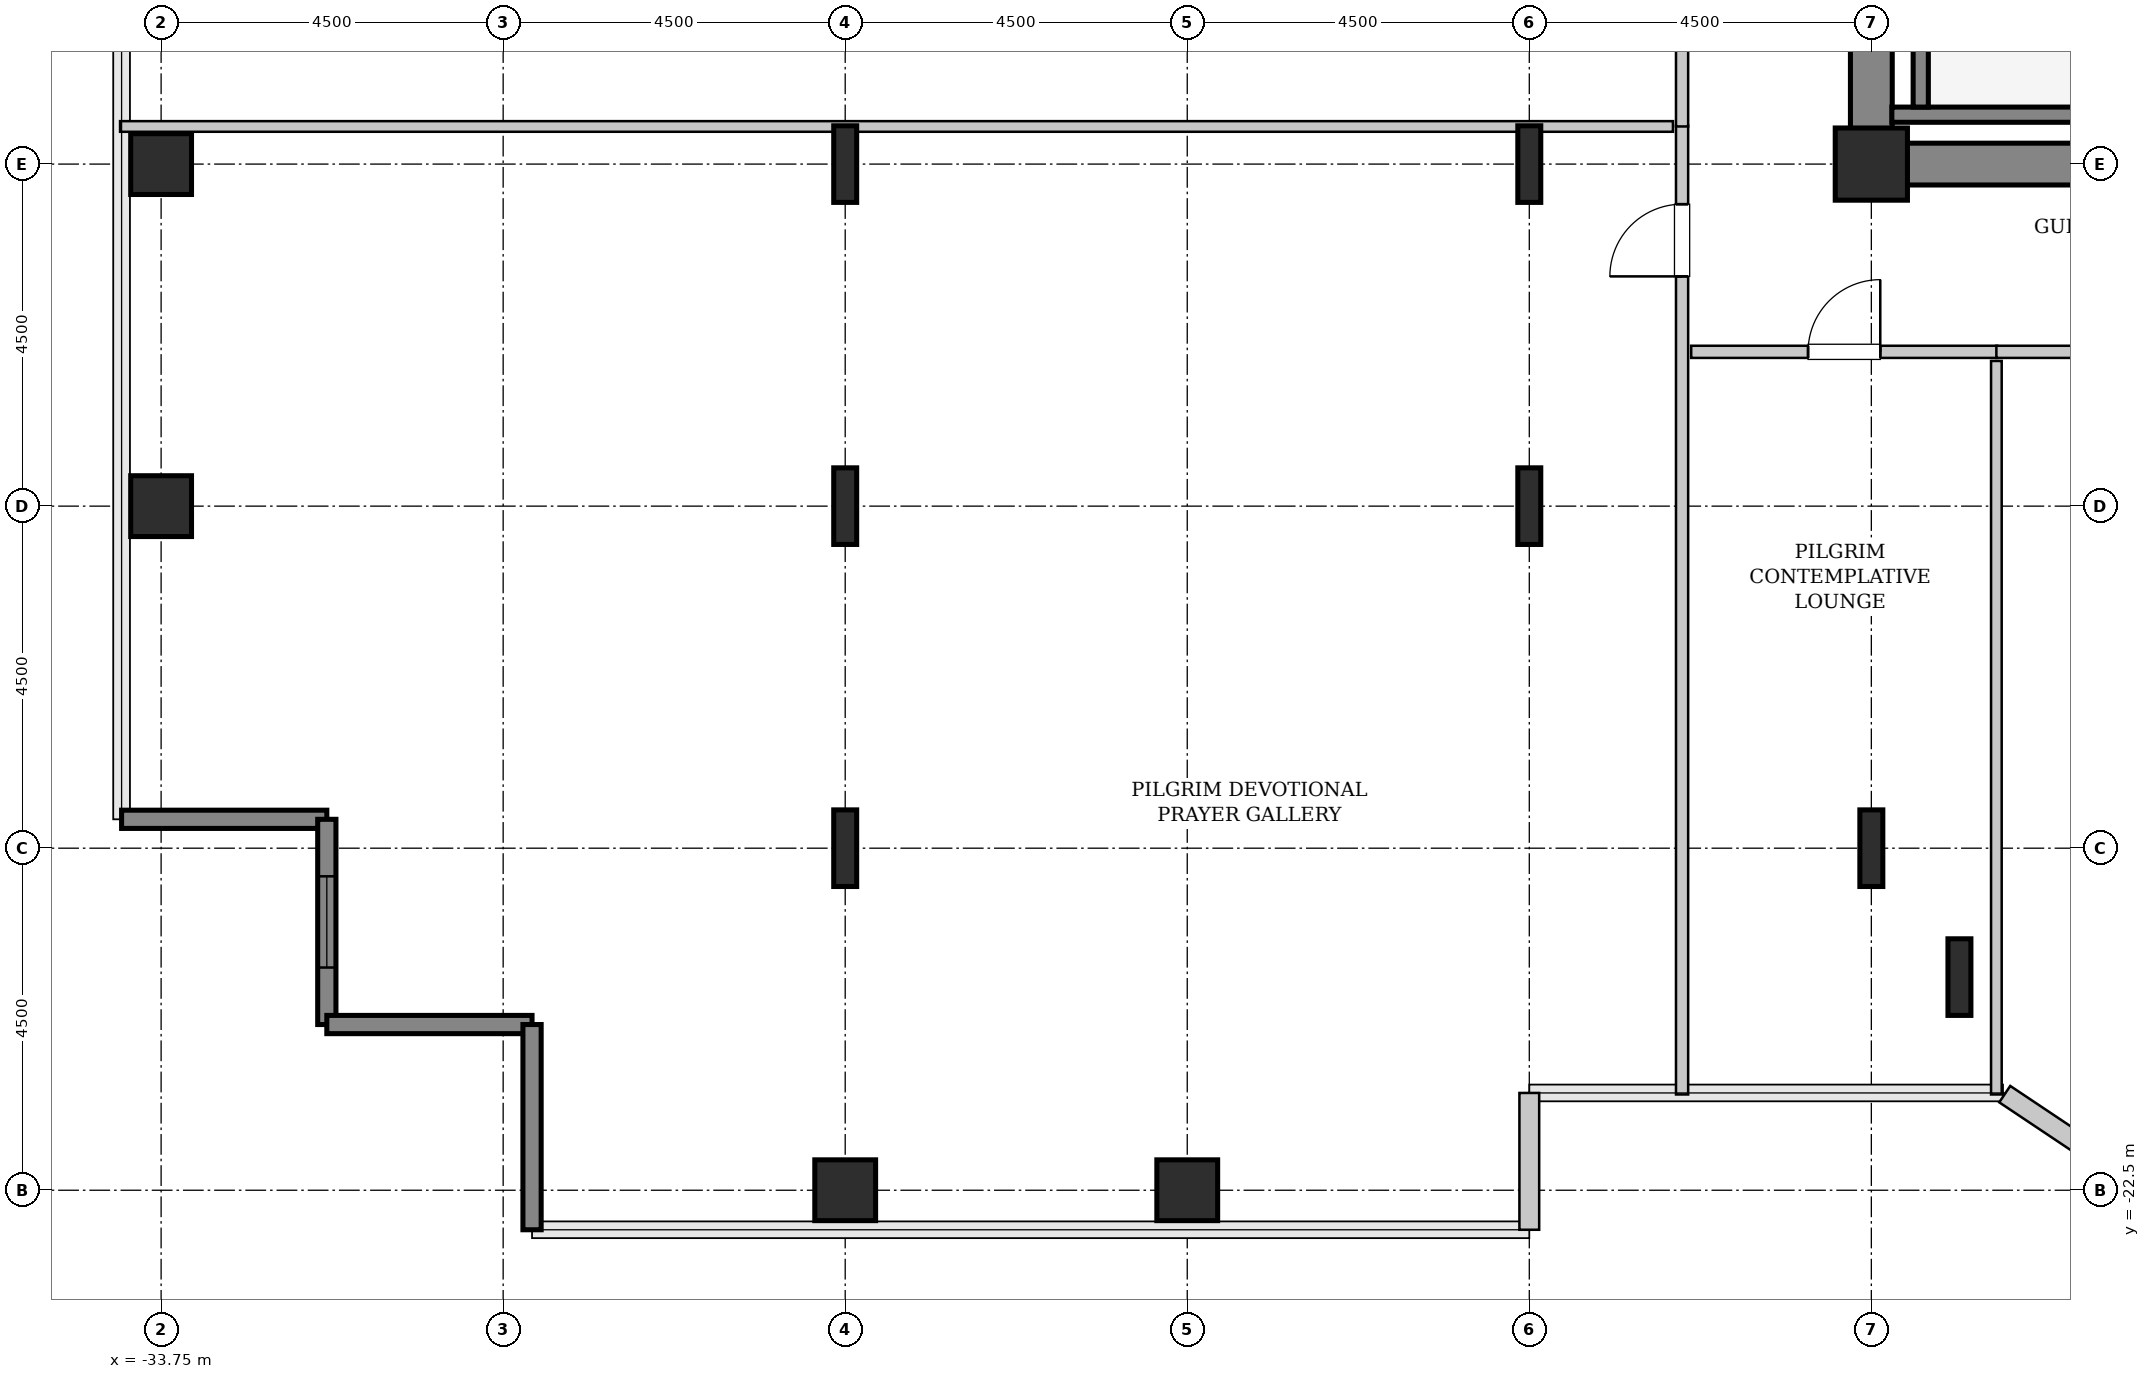
"""IFC4 building model, lengths in metres.
Left out: names, types, materials, properties, quantities, classifications, styles, units other than length and angle.
Written with IfcOpenShell. Run it as: python <this file> out.ifc"""

import sys

from ifc_helpers import new_model, si_unit, direction, frame, frame_2d, origin, origin_2d, place, context, subcontext, project, spatial, rectangle, hollow_rectangle, i_section, extrude, source, transform, mapped, element, fill, save


model = new_model("IFC4")
c1 = context("Model", 3, precision=1e-05, world=origin(), true_north=direction((0.0, 1.0)))
c2 = subcontext(c1, "Body", "Model", "MODEL_VIEW")
j1 = project(units=[si_unit("LENGTHUNIT", "METRE"), si_unit("PLANEANGLEUNIT", "RADIAN")], contexts=[c1])
p1 = place(None, origin())
s1 = spatial("IfcSite", under=j1, at=p1, CompositionType="ELEMENT")
p2 = place(p1, origin())
s2 = spatial("IfcBuilding", under=s1, at=p2, CompositionType="ELEMENT")
p3 = place(p2, frame((0.0, 0.0, 121.2)))
s3 = spatial("IfcBuildingStorey", under=s2, at=p3, CompositionType="ELEMENT", Elevation=121.2)
m1 = source(origin(), c2, "Body", "SweptSolid", [
    extrude(rectangle(XDim=9.975, YDim=0.55, at=frame_2d((4.987, 0.0))), origin(), (0.0, 0.0, 1.0), 3.8),
])
p4 = place(p3, frame((-11.525, -9.0, 0.0), z_axis=(0.0, 0.0, 1.0), x_axis=(1.0, 0.0, 0.0)))
e1 = element("IfcWall", 1, at=p4, inside=s3, PredefinedType="SHEAR", context=c2, shape_type="MappedRepresentation", body=[
    mapped(m1, transform((0.0, 0.0, 0.0), x_axis=(1.0, 0.0, 0.0), y_axis=(0.0, 1.0, 0.0), z_axis=(0.0, 0.0, 1.0), scale=1.0)),
])
m2 = source(origin(), c2, "Body", "SweptSolid", [
    extrude(rectangle(XDim=7.375, YDim=0.55, at=frame_2d((3.688, 0.0))), origin(), (0.0, 0.0, 1.0), 3.8),
])
p5 = place(p3, frame((-11.25, -8.725, 0.0), z_axis=(0.0, 0.0, 1.0), x_axis=(0.0, 1.0, 0.0)))
e2 = element("IfcWall", 2, at=p5, inside=s3, PredefinedType="SHEAR", context=c2, shape_type="MappedRepresentation", body=[
    mapped(m2, transform((0.0, 0.0, 0.0), x_axis=(1.0, 0.0, 0.0), y_axis=(0.0, 1.0, 0.0), z_axis=(0.0, 0.0, 1.0), scale=1.0)),
])
m3 = source(origin(), c2, "Body", "SweptSolid", [
    extrude(hollow_rectangle(XDim=0.8, YDim=0.8, WallThickness=0.04, InnerFilletRadius=0.04, OuterFilletRadius=0.08, at=origin_2d()), origin(), (0.0, 0.0, 1.0), 3.8),
])
for number, where, z_axis, x_axis in (
    (3, (-33.75, -13.5, 0.0), (0.0, 0.0, 1.0), (1.0, 0.0, 0.0)),
    (4, (-33.75, -9.0, 0.0), (0.0, 0.0, 1.0), (1.0, 0.0, 0.0)),
    (5, (-24.75, -22.5, 0.0), (0.0, 0.0, 1.0), (1.0, 0.0, 0.0)),
):
    element("IfcColumn", number, at=place(p3, frame(where, z_axis=z_axis, x_axis=x_axis)), inside=s3, PredefinedType="COLUMN", context=c2, shape_type="MappedRepresentation", body=[
        mapped(m3, transform((0.0, 0.0, 0.0), x_axis=(1.0, 0.0, 0.0), y_axis=(0.0, 1.0, 0.0), z_axis=(0.0, 0.0, 1.0), scale=1.0)),
    ])
m4 = source(origin(), c2, "Body", "SweptSolid", [
    extrude(i_section(OverallWidth=0.302, OverallDepth=1.008, WebThickness=0.021, FlangeThickness=0.04, FilletRadius=0.03, at=origin_2d()), origin(), (0.0, 0.0, 1.0), 3.8),
])
for number, where, z_axis, x_axis in (
    (6, (-24.75, -18.0, 0.0), (0.0, 0.0, 1.0), (1.0, 0.0, 0.0)),
    (7, (-24.75, -13.5, 0.0), (0.0, 0.0, 1.0), (1.0, 0.0, 0.0)),
    (8, (-24.75, -9.0, 0.0), (0.0, 0.0, 1.0), (1.0, 0.0, 0.0)),
):
    element("IfcColumn", number, at=place(p3, frame(where, z_axis=z_axis, x_axis=x_axis)), inside=s3, PredefinedType="COLUMN", context=c2, shape_type="MappedRepresentation", body=[
        mapped(m4, transform((0.0, 0.0, 0.0), x_axis=(1.0, 0.0, 0.0), y_axis=(0.0, 1.0, 0.0), z_axis=(0.0, 0.0, 1.0), scale=1.0)),
    ])
p6 = place(p3, frame((-20.25, -22.5, 0.0), z_axis=(0.0, 0.0, 1.0), x_axis=(1.0, 0.0, 0.0)))
e9 = element("IfcColumn", 9, at=p6, inside=s3, PredefinedType="COLUMN", context=c2, shape_type="MappedRepresentation", body=[
    mapped(m3, transform((0.0, 0.0, 0.0), x_axis=(1.0, 0.0, 0.0), y_axis=(0.0, 1.0, 0.0), z_axis=(0.0, 0.0, 1.0), scale=1.0)),
])
for number, where, z_axis, x_axis in (
    (10, (-15.75, -13.5, 0.0), (0.0, 0.0, 1.0), (1.0, 0.0, 0.0)),
    (11, (-15.75, -9.0, 0.0), (0.0, 0.0, 1.0), (1.0, 0.0, 0.0)),
    (12, (-11.25, -18.0, 0.0), (0.0, 0.0, 1.0), (1.0, 0.0, 0.0)),
):
    element("IfcColumn", number, at=place(p3, frame(where, z_axis=z_axis, x_axis=x_axis)), inside=s3, PredefinedType="COLUMN", context=c2, shape_type="MappedRepresentation", body=[
        mapped(m4, transform((0.0, 0.0, 0.0), x_axis=(1.0, 0.0, 0.0), y_axis=(0.0, 1.0, 0.0), z_axis=(0.0, 0.0, 1.0), scale=1.0)),
    ])
m5 = source(origin(), c2, "Body", "SweptSolid", [
    extrude(hollow_rectangle(XDim=0.95, YDim=0.95, WallThickness=0.045, InnerFilletRadius=0.045, OuterFilletRadius=0.09, at=origin_2d()), origin(), (0.0, 0.0, 1.0), 3.8),
])
p7 = place(p3, frame((-11.25, -9.0, 0.0), z_axis=(0.0, 0.0, 1.0), x_axis=(1.0, 0.0, 0.0)))
e13 = element("IfcColumn", 13, at=p7, inside=s3, PredefinedType="COLUMN", context=c2, shape_type="MappedRepresentation", body=[
    mapped(m5, transform((0.0, 0.0, 0.0), x_axis=(1.0, 0.0, 0.0), y_axis=(0.0, 1.0, 0.0), z_axis=(0.0, 0.0, 1.0), scale=1.0)),
])
p8 = place(p3, frame((-10.091, -19.696, 0.0), z_axis=(0.0, 0.0, 1.0), x_axis=(1.0, 0.0, 0.0)))
e14 = element("IfcColumn", 14, at=p8, inside=s3, PredefinedType="COLUMN", context=c2, shape_type="MappedRepresentation", body=[
    mapped(m4, transform((0.0, 0.0, 0.0), x_axis=(1.0, 0.0, 0.0), y_axis=(0.0, 1.0, 0.0), z_axis=(0.0, 0.0, 1.0), scale=1.0)),
])
m6 = source(origin(), c2, "Body", "SweptSolid", [
    extrude(rectangle(XDim=2.7, YDim=0.24, at=frame_2d((1.35, 0.0))), origin(), (0.0, 0.0, 1.0), 3.55),
])
p9 = place(p3, frame((-34.27, -17.62, 0.0), z_axis=(0.0, 0.0, 1.0), x_axis=(1.0, 0.0, 0.0)))
e15 = element("IfcWall", 15, at=p9, inside=s3, PredefinedType="SHEAR", context=c2, shape_type="MappedRepresentation", body=[
    mapped(m6, transform((0.0, 0.0, 0.0), x_axis=(1.0, 0.0, 0.0), y_axis=(0.0, 1.0, 0.0), z_axis=(0.0, 0.0, 1.0), scale=1.0)),
])
p10 = place(p3, frame((-31.57, -17.62, 0.0), z_axis=(0.0, 0.0, 1.0), x_axis=(0.0, -1.0, 0.0)))
e16 = element("IfcWall", 16, at=p10, inside=s3, PredefinedType="SHEAR", context=c2, shape_type="MappedRepresentation", body=[
    mapped(m6, transform((0.0, 0.0, 0.0), x_axis=(1.0, 0.0, 0.0), y_axis=(0.0, 1.0, 0.0), z_axis=(0.0, 0.0, 1.0), scale=1.0)),
])
p11 = place(p10, frame((0.75, 0.0, 0.85)))
e17 = element("IfcOpeningElement", 17, at=p11, cuts=e16, PredefinedType="OPENING", context=c2, shape_type="SweptSolid", body=[
    extrude(rectangle(XDim=1.2, YDim=1.8, at=frame_2d((0.6, 0.9))), frame((0.0, 0.13, 0.0), z_axis=(0.0, -1.0, 0.0), x_axis=(1.0, 0.0, 0.0)), (0.0, 0.0, 1.0), 0.26),
])
for number, where, z_axis, x_axis in (
    (18, (-31.57, -20.32, 0.0), (0.0, 0.0, 1.0), (1.0, 0.0, 0.0)),
    (19, (-28.87, -20.32, 0.0), (0.0, 0.0, 1.0), (0.0, -1.0, 0.0)),
):
    element("IfcWall", number, at=place(p3, frame(where, z_axis=z_axis, x_axis=x_axis)), inside=s3, PredefinedType="SHEAR", context=c2, shape_type="MappedRepresentation", body=[
        mapped(m6, transform((0.0, 0.0, 0.0), x_axis=(1.0, 0.0, 0.0), y_axis=(0.0, 1.0, 0.0), z_axis=(0.0, 0.0, 1.0), scale=1.0)),
    ])
m7 = source(origin(), c2, "Body", "SweptSolid", [
    extrude(rectangle(XDim=1.8, YDim=0.26, at=frame_2d((0.9, 0.0))), origin(), (0.0, 0.0, 1.0), 3.55),
])
p12 = place(p3, frame((-15.75, -23.02, 0.0), z_axis=(0.0, 0.0, 1.0), x_axis=(0.0, 1.0, 0.0)))
e20 = element("IfcWall", 20, at=p12, inside=s3, PredefinedType="SOLIDWALL", context=c2, shape_type="MappedRepresentation", body=[
    mapped(m7, transform((0.0, 0.0, 0.0), x_axis=(1.0, 0.0, 0.0), y_axis=(0.0, 1.0, 0.0), z_axis=(0.0, 0.0, 1.0), scale=1.0)),
])
m8 = source(origin(), c2, "Body", "SweptSolid", [
    extrude(rectangle(XDim=1.469, YDim=0.26, at=frame_2d((0.734, 0.0))), origin(), (0.0, 0.0, 1.0), 3.55),
])
p13 = place(p3, frame((-9.495, -21.236, 0.0), z_axis=(0.0, 0.0, 1.0), x_axis=(0.831461760506, -0.555581983884, 0.0)))
e21 = element("IfcWall", 21, at=p13, inside=s3, PredefinedType="SOLIDWALL", context=c2, shape_type="MappedRepresentation", body=[
    mapped(m8, transform((0.0, 0.0, 0.0), x_axis=(1.0, 0.0, 0.0), y_axis=(0.0, 1.0, 0.0), z_axis=(0.0, 0.0, 1.0), scale=1.0)),
])
m9 = source(origin(), c2, "Body", "SweptSolid", [
    extrude(rectangle(XDim=3.68, YDim=0.2, at=frame_2d((1.84, 0.0))), origin(), (0.0, 0.0, 1.0), 3.8),
])
p14 = place(p3, frame((-10.98, -8.35, 0.0), z_axis=(0.0, 0.0, 1.0), x_axis=(1.0, 0.0, 0.0)))
e22 = element("IfcWall", 22, at=p14, inside=s3, PredefinedType="SOLIDWALL", context=c2, shape_type="MappedRepresentation", body=[
    mapped(m9, transform((0.0, 0.0, 0.0), x_axis=(1.0, 0.0, 0.0), y_axis=(0.0, 1.0, 0.0), z_axis=(0.0, 0.0, 1.0), scale=1.0)),
])
m10 = source(origin(), c2, "Body", "SweptSolid", [
    extrude(rectangle(XDim=7.1, YDim=0.2, at=frame_2d((3.55, 0.0))), origin(), (0.0, 0.0, 1.0), 3.8),
])
p15 = place(p3, frame((-10.6, -1.15, 0.0), z_axis=(0.0, 0.0, 1.0), x_axis=(0.0, -1.0, 0.0)))
e23 = element("IfcWall", 23, at=p15, inside=s3, PredefinedType="SOLIDWALL", context=c2, shape_type="MappedRepresentation", body=[
    mapped(m10, transform((0.0, 0.0, 0.0), x_axis=(1.0, 0.0, 0.0), y_axis=(0.0, 1.0, 0.0), z_axis=(0.0, 0.0, 1.0), scale=1.0)),
])
m11 = source(origin(), c2, "Body", "SweptSolid", [
    extrude(rectangle(XDim=12.745, YDim=0.16, at=frame_2d((6.373, 0.0))), origin(), (0.0, 0.0, 1.0), 3.535),
])
p16 = place(p3, frame((-13.74, -21.24, 0.0), z_axis=(0.0, 0.0, 1.0), x_axis=(0.0, 1.0, 0.0)))
e24 = element("IfcWall", 24, at=p16, inside=s3, PredefinedType="PARTITIONING", context=c2, shape_type="MappedRepresentation", body=[
    mapped(m11, transform((0.0, 0.0, 0.0), x_axis=(1.0, 0.0, 0.0), y_axis=(0.0, 1.0, 0.0), z_axis=(0.0, 0.0, 1.0), scale=1.0)),
])
p17 = place(p16, frame((10.762, 0.0, 0.0)))
e25 = element("IfcOpeningElement", 25, at=p17, cuts=e24, PredefinedType="OPENING", context=c2, shape_type="SweptSolid", body=[
    extrude(rectangle(XDim=0.95, YDim=2.1, at=frame_2d((0.475, 1.05))), frame((0.0, 0.09, 0.0), z_axis=(0.0, -1.0, 0.0), x_axis=(1.0, 0.0, 0.0)), (0.0, 0.0, 1.0), 0.18),
])
m12 = source(origin(), c2, "Body", "SweptSolid", [
    extrude(rectangle(XDim=20.43, YDim=0.14, at=frame_2d((10.215, 0.0))), origin(), (0.0, 0.0, 1.0), 2.875),
])
p18 = place(p3, frame((-34.29, -8.505, 0.0), z_axis=(0.0, 0.0, 1.0), x_axis=(1.0, 0.0, 0.0)))
e26 = element("IfcWall", 26, at=p18, inside=s3, PredefinedType="PARTITIONING", context=c2, shape_type="MappedRepresentation", body=[
    mapped(m12, transform((0.0, 0.0, 0.0), x_axis=(1.0, 0.0, 0.0), y_axis=(0.0, 1.0, 0.0), z_axis=(0.0, 0.0, 1.0), scale=1.0)),
])
m13 = source(origin(), c2, "Body", "SweptSolid", [
    extrude(rectangle(XDim=3.31, YDim=0.16, at=frame_2d((1.655, 0.0))), origin(), (0.0, 0.0, 1.0), 3.535),
])
p19 = place(p3, frame((-13.74, -8.505, 0.0), z_axis=(0.0, 0.0, 1.0), x_axis=(0.0, 1.0, 0.0)))
e27 = element("IfcWall", 27, at=p19, inside=s3, PredefinedType="PARTITIONING", context=c2, shape_type="MappedRepresentation", body=[
    mapped(m13, transform((0.0, 0.0, 0.0), x_axis=(1.0, 0.0, 0.0), y_axis=(0.0, 1.0, 0.0), z_axis=(0.0, 0.0, 1.0), scale=1.0)),
])
p20 = place(p19, frame((1.18, 0.0, 0.0)))
e28 = element("IfcOpeningElement", 28, at=p20, cuts=e27, PredefinedType="OPENING", context=c2, shape_type="SweptSolid", body=[
    extrude(rectangle(XDim=0.95, YDim=2.1, at=frame_2d((0.475, 1.05))), frame((0.0, 0.09, 0.0), z_axis=(0.0, -1.0, 0.0), x_axis=(1.0, 0.0, 0.0)), (0.0, 0.0, 1.0), 0.18),
])
m14 = source(origin(), c2, "Body", "SweptSolid", [
    extrude(rectangle(XDim=4.025, YDim=0.16, at=frame_2d((2.013, 0.0))), origin(), (0.0, 0.0, 1.0), 3.535),
])
p21 = place(p3, frame((-13.62, -11.47, 0.0), z_axis=(0.0, 0.0, 1.0), x_axis=(1.0, 0.0, 0.0)))
e29 = element("IfcWall", 29, at=p21, inside=s3, PredefinedType="PARTITIONING", context=c2, shape_type="MappedRepresentation", body=[
    mapped(m14, transform((0.0, 0.0, 0.0), x_axis=(1.0, 0.0, 0.0), y_axis=(0.0, 1.0, 0.0), z_axis=(0.0, 0.0, 1.0), scale=1.0)),
])
p22 = place(p21, frame((1.538, 0.0, 0.0)))
e30 = element("IfcOpeningElement", 30, at=p22, cuts=e29, PredefinedType="OPENING", context=c2, shape_type="SweptSolid", body=[
    extrude(rectangle(XDim=0.95, YDim=2.1, at=frame_2d((0.475, 1.05))), frame((0.0, 0.09, 0.0), z_axis=(0.0, -1.0, 0.0), x_axis=(1.0, 0.0, 0.0)), (0.0, 0.0, 1.0), 0.18),
])
m15 = source(origin(), c2, "Body", "SweptSolid", [
    extrude(rectangle(XDim=9.65, YDim=0.14, at=frame_2d((4.825, 0.0))), origin(), (0.0, 0.0, 1.0), 3.535),
])
p23 = place(p3, frame((-9.605, -21.24, 0.0), z_axis=(0.0, 0.0, 1.0), x_axis=(0.0, 1.0, 0.0)))
e31 = element("IfcWall", 31, at=p23, inside=s3, PredefinedType="PARTITIONING", context=c2, shape_type="MappedRepresentation", body=[
    mapped(m15, transform((0.0, 0.0, 0.0), x_axis=(1.0, 0.0, 0.0), y_axis=(0.0, 1.0, 0.0), z_axis=(0.0, 0.0, 1.0), scale=1.0)),
])
m16 = source(origin(), c2, "Body", "SweptSolid", [
    extrude(rectangle(XDim=4.61, YDim=0.16, at=frame_2d((2.305, 0.0))), origin(), (0.0, 0.0, 1.0), 3.535),
])
p24 = place(p3, frame((-9.605, -11.47, 0.0), z_axis=(0.0, 0.0, 1.0), x_axis=(1.0, 0.0, 0.0)))
e32 = element("IfcWall", 32, at=p24, inside=s3, PredefinedType="PARTITIONING", context=c2, shape_type="MappedRepresentation", body=[
    mapped(m16, transform((0.0, 0.0, 0.0), x_axis=(1.0, 0.0, 0.0), y_axis=(0.0, 1.0, 0.0), z_axis=(0.0, 0.0, 1.0), scale=1.0)),
])
p25 = place(p24, frame((1.83, 0.0, 0.0)))
e33 = element("IfcOpeningElement", 33, at=p25, cuts=e32, PredefinedType="OPENING", context=c2, shape_type="SweptSolid", body=[
    extrude(rectangle(XDim=0.95, YDim=2.1, at=frame_2d((0.475, 1.05))), frame((0.0, 0.09, 0.0), z_axis=(0.0, -1.0, 0.0), x_axis=(1.0, 0.0, 0.0)), (0.0, 0.0, 1.0), 0.18),
])
m17 = source(origin(), c2, "Body", "SweptSolid", [
    extrude(rectangle(XDim=1.2, YDim=1.8, at=frame_2d((0.6, 0.9))), frame((0.0, 0.03, 0.0), z_axis=(0.0, -1.0, 0.0), x_axis=(1.0, 0.0, 0.0)), (0.0, 0.0, 1.0), 0.06),
])
p26 = place(p11, origin())
e34 = element("IfcWindow", 34, at=p26, inside=s3, PartitioningType="SINGLE_PANEL", PredefinedType="WINDOW", context=c2, shape_type="MappedRepresentation", body=[
    mapped(m17, transform((0.0, 0.0, 0.0), x_axis=(1.0, 0.0, 0.0), y_axis=(0.0, 1.0, 0.0), z_axis=(0.0, 0.0, 1.0), scale=1.0)),
])
fill(e17, e34)
m18 = source(origin(), c2, "Body", "SweptSolid", [
    extrude(rectangle(XDim=0.95, YDim=2.1, at=frame_2d((0.475, 1.05))), frame((0.0, 0.025, 0.0), z_axis=(0.0, -1.0, 0.0), x_axis=(1.0, 0.0, 0.0)), (0.0, 0.0, 1.0), 0.05),
])
p27 = place(p17, origin())
e35 = element("IfcDoor", 35, at=p27, inside=s3, OperationType="SINGLE_SWING_LEFT", PredefinedType="DOOR", context=c2, shape_type="MappedRepresentation", body=[
    mapped(m18, transform((0.0, 0.0, 0.0), x_axis=(1.0, 0.0, 0.0), y_axis=(0.0, 1.0, 0.0), z_axis=(0.0, 0.0, 1.0), scale=1.0)),
])
fill(e25, e35)
p28 = place(p22, origin())
e36 = element("IfcDoor", 36, at=p28, inside=s3, OperationType="SINGLE_SWING_RIGHT", PredefinedType="DOOR", context=c2, shape_type="MappedRepresentation", body=[
    mapped(m18, transform((0.0, 0.0, 0.0), x_axis=(1.0, 0.0, 0.0), y_axis=(0.0, 1.0, 0.0), z_axis=(0.0, 0.0, 1.0), scale=1.0)),
])
fill(e30, e36)
save(model, sys.argv[1])
